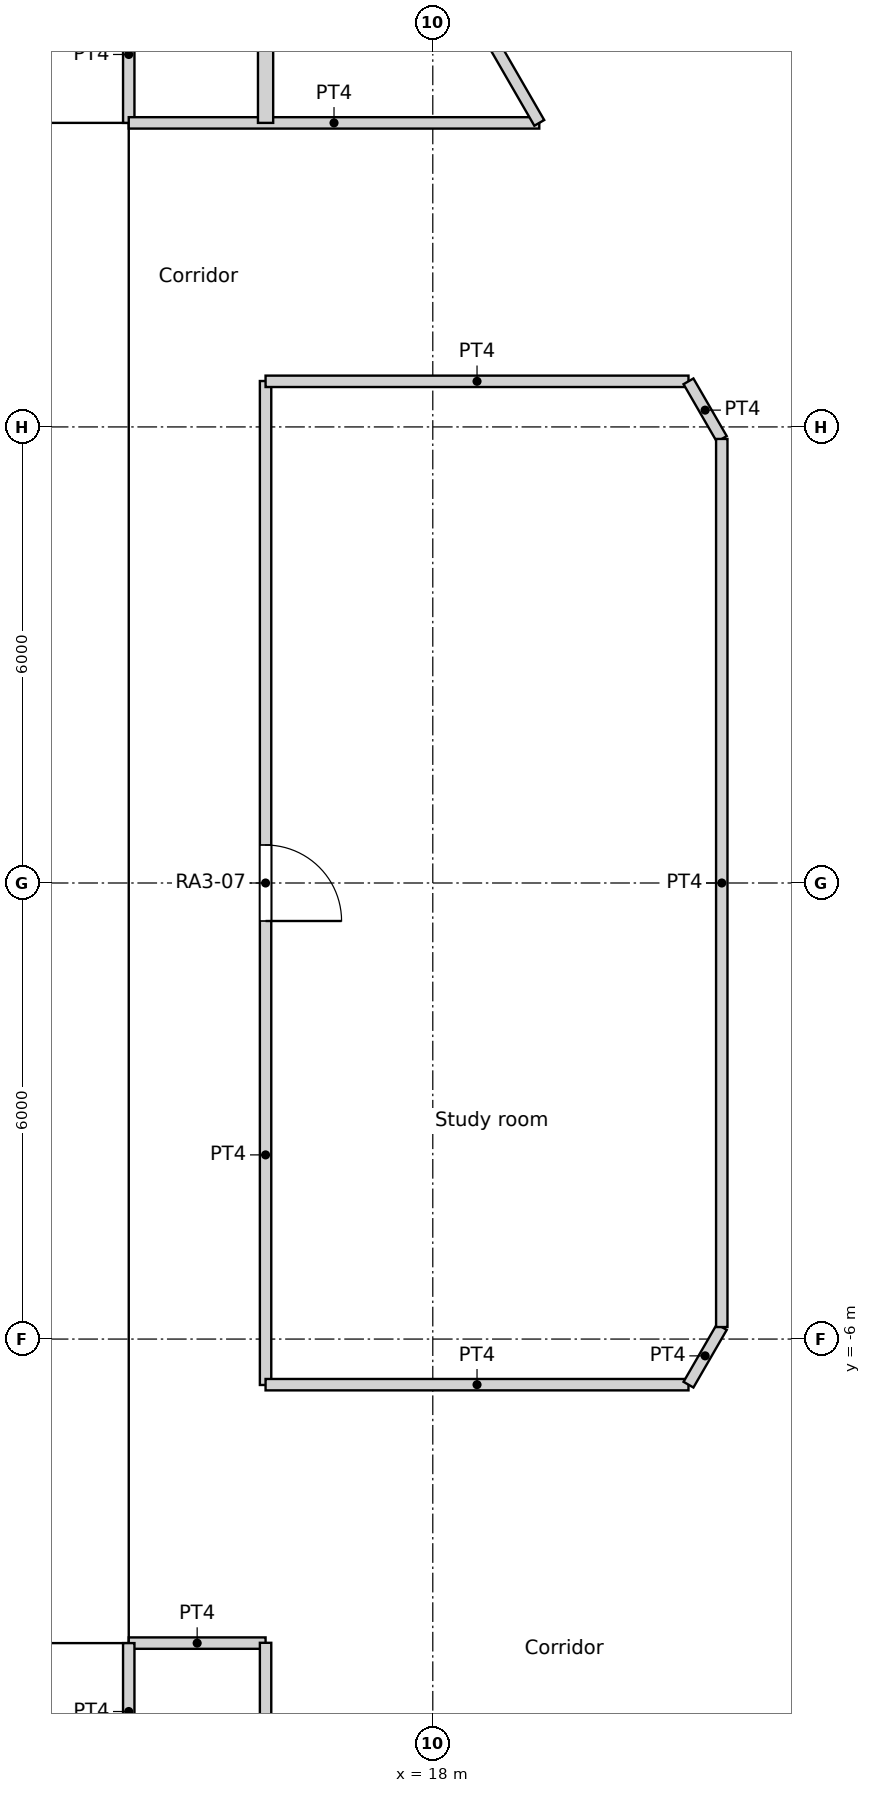
"""IFC4 building model, lengths in metres.
Left out: names, types, materials, properties, quantities, classifications, styles, units other than length and angle.
Written with IfcOpenShell. Run it as: python <this file> out.ifc"""

import sys

from ifc_helpers import new_model, si_unit, direction, frame, frame_2d, origin, origin_2d, place, context, subcontext, project, spatial, rectangle, circle, extrude, element, fill, save


model = new_model("IFC4")
c1 = context("Model", 3, precision=1e-05, world=origin(), true_north=direction((0.0, 1.0)))
c2 = subcontext(c1, "Body", "Model", "MODEL_VIEW")
j1 = project(units=[si_unit("LENGTHUNIT", "METRE"), si_unit("PLANEANGLEUNIT", "RADIAN")], contexts=[c1])
p1 = place(None, origin())
s1 = spatial("IfcSite", under=j1, at=p1, CompositionType="ELEMENT")
p2 = place(p1, origin())
s2 = spatial("IfcBuilding", under=s1, at=p2, CompositionType="ELEMENT")
p3 = place(p2, frame((0.0, 0.0, 49.8)))
s3 = spatial("IfcBuildingStorey", under=s2, at=p3, CompositionType="ELEMENT", Elevation=49.8)
for number, where, z_axis, x_axis in (
    (1, (21.937, 11.017, 0.0), (0.0, 0.0, 1.0), (1.0, 0.0, 0.0)),
    (2, (21.937, -11.017, 0.0), (0.0, 0.0, 1.0), (1.0, 0.0, 0.0)),
):
    element("IfcColumn", number, at=place(p3, frame(where, z_axis=z_axis, x_axis=x_axis)), inside=s3, PredefinedType="COLUMN", context=c2, shape_type="SweptSolid", body=[
        extrude(circle(Radius=0.75, at=origin_2d()), origin(), (0.0, 0.0, 1.0), 3.6),
    ])
for number, where, z_axis, x_axis in (
    (3, (18.822, 0.0, 0.0), (0.0, 0.0, 1.0), (1.0, 0.0, 0.0)),
    (4, (17.986, 5.548, 0.0), (0.0, 0.0, 1.0), (1.0, 0.0, 0.0)),
    (5, (15.552, 10.603, 0.0), (0.0, 0.0, 1.0), (1.0, 0.0, 0.0)),
    (6, (15.552, -10.603, 0.0), (0.0, 0.0, 1.0), (1.0, 0.0, 0.0)),
    (7, (17.986, -5.548, 0.0), (0.0, 0.0, 1.0), (1.0, 0.0, 0.0)),
):
    element("IfcColumn", number, at=place(p3, frame(where, z_axis=z_axis, x_axis=x_axis)), inside=s3, PredefinedType="COLUMN", context=c2, shape_type="SweptSolid", body=[
        extrude(circle(Radius=0.8, at=origin_2d()), origin(), (0.0, 0.0, 1.0), 3.6),
    ])
p4 = place(p3, frame((-14.0, -9.4, 0.0), z_axis=(0.0, 0.0, 1.0), x_axis=(1.0, 0.0, 0.0)))
e8 = element("IfcWall", 8, at=p4, inside=s3, PredefinedType="SOLIDWALL", context=c2, shape_type="SweptSolid", body=[
    extrude(rectangle(XDim=28.0, YDim=1.2, at=frame_2d((14.0, 0.0))), origin(), (0.0, 0.0, 1.0), 3.6),
])
p5 = place(p4, frame((14.9, 0.0, 0.0)))
e9 = element("IfcOpeningElement", 9, at=p5, cuts=e8, PredefinedType="OPENING", context=c2, shape_type="SweptSolid", body=[
    extrude(rectangle(XDim=1.0, YDim=2.1, at=frame_2d((0.5, 1.05))), frame((0.0, 0.6, 0.0), z_axis=(0.0, -1.0, 0.0), x_axis=(1.0, 0.0, 0.0)), (0.0, 0.0, 1.0), 1.2),
])
p6 = place(p4, frame((9.8, 0.0, 0.0)))
e10 = element("IfcOpeningElement", 10, at=p6, cuts=e8, PredefinedType="OPENING", context=c2, shape_type="SweptSolid", body=[
    extrude(rectangle(XDim=1.8, YDim=2.1, at=frame_2d((0.9, 1.05))), frame((0.0, 0.6, 0.0), z_axis=(0.0, -1.0, 0.0), x_axis=(1.0, 0.0, 0.0)), (0.0, 0.0, 1.0), 1.2),
])
p7 = place(p4, frame((16.4, 0.0, 0.0)))
e11 = element("IfcOpeningElement", 11, at=p7, cuts=e8, PredefinedType="OPENING", context=c2, shape_type="SweptSolid", body=[
    extrude(rectangle(XDim=1.8, YDim=2.1, at=frame_2d((0.9, 1.05))), frame((0.0, 0.6, 0.0), z_axis=(0.0, -1.0, 0.0), x_axis=(1.0, 0.0, 0.0)), (0.0, 0.0, 1.0), 1.2),
])
p8 = place(p3, frame((-14.0, 9.4, 0.0), z_axis=(0.0, 0.0, 1.0), x_axis=(1.0, 0.0, 0.0)))
e12 = element("IfcWall", 12, at=p8, inside=s3, PredefinedType="SOLIDWALL", context=c2, shape_type="SweptSolid", body=[
    extrude(rectangle(XDim=28.0, YDim=1.2, at=frame_2d((14.0, 0.0))), origin(), (0.0, 0.0, 1.0), 3.6),
])
p9 = place(p8, frame((9.8, 0.0, 0.0)))
e13 = element("IfcOpeningElement", 13, at=p9, cuts=e12, PredefinedType="OPENING", context=c2, shape_type="SweptSolid", body=[
    extrude(rectangle(XDim=1.8, YDim=2.1, at=frame_2d((0.9, 1.05))), frame((0.0, 0.6, 0.0), z_axis=(0.0, -1.0, 0.0), x_axis=(1.0, 0.0, 0.0)), (0.0, 0.0, 1.0), 1.2),
])
p10 = place(p3, frame((13.4, -8.8, 0.0), z_axis=(0.0, 0.0, 1.0), x_axis=(0.0, 1.0, 0.0)))
e14 = element("IfcWall", 14, at=p10, inside=s3, PredefinedType="SOLIDWALL", context=c2, shape_type="SweptSolid", body=[
    extrude(rectangle(XDim=17.6, YDim=1.2, at=frame_2d((8.8, 0.0))), origin(), (0.0, 0.0, 1.0), 3.6),
])
p11 = place(p10, frame((6.3, 0.0, 0.0)))
e15 = element("IfcOpeningElement", 15, at=p11, cuts=e14, PredefinedType="OPENING", context=c2, shape_type="SweptSolid", body=[
    extrude(rectangle(XDim=1.0, YDim=2.1, at=frame_2d((0.5, 1.05))), frame((0.0, 0.6, 0.0), z_axis=(0.0, -1.0, 0.0), x_axis=(1.0, 0.0, 0.0)), (0.0, 0.0, 1.0), 1.2),
])
for number, where, z_axis, x_axis in (
    (16, (14.0, 10.0, 0.0), (0.0, 0.0, 1.0), (0.0, 1.0, 0.0)),
    (17, (14.0, -11.8, 0.0), (0.0, 0.0, 1.0), (0.0, 1.0, 0.0)),
):
    element("IfcWall", number, at=place(p3, frame(where, z_axis=z_axis, x_axis=x_axis)), inside=s3, PredefinedType="PARTITIONING", context=c2, shape_type="SweptSolid", body=[
        extrude(rectangle(XDim=1.8, YDim=0.15, at=frame_2d((0.9, 0.0))), origin(), (0.0, 0.0, 1.0), 3.15),
    ])
p12 = place(p3, frame((14.0, 10.0, 0.0), z_axis=(0.0, 0.0, 1.0), x_axis=(1.0, 0.0, 0.0)))
e18 = element("IfcWall", 18, at=p12, inside=s3, PredefinedType="PARTITIONING", context=c2, shape_type="SweptSolid", body=[
    extrude(rectangle(XDim=5.401, YDim=0.15, at=frame_2d((2.7, 0.0))), origin(), (0.0, 0.0, 1.0), 3.15),
])
p13 = place(p3, frame((14.0, -10.0, 0.0), z_axis=(0.0, 0.0, 1.0), x_axis=(1.0, 0.0, 0.0)))
e19 = element("IfcWall", 19, at=p13, inside=s3, PredefinedType="PARTITIONING", context=c2, shape_type="SweptSolid", body=[
    extrude(rectangle(XDim=1.8, YDim=0.15, at=frame_2d((0.9, 0.0))), origin(), (0.0, 0.0, 1.0), 3.15),
])
p14 = place(p3, frame((15.8, -6.604, 0.0), z_axis=(0.0, 0.0, 1.0), x_axis=(0.0, 1.0, 0.0)))
e20 = element("IfcWall", 20, at=p14, inside=s3, PredefinedType="PARTITIONING", context=c2, shape_type="SweptSolid", body=[
    extrude(rectangle(XDim=13.208, YDim=0.15, at=frame_2d((6.604, 0.0))), origin(), (0.0, 0.0, 1.0), 3.15),
])
p15 = place(p14, frame((6.104, 0.0, 0.0)))
e21 = element("IfcOpeningElement", 21, at=p15, cuts=e20, PredefinedType="OPENING", context=c2, shape_type="SweptSolid", body=[
    extrude(rectangle(XDim=1.0, YDim=2.04, at=frame_2d((0.5, 1.02))), frame((0.0, 0.075, 0.0), z_axis=(0.0, -1.0, 0.0), x_axis=(1.0, 0.0, 0.0)), (0.0, 0.0, 1.0), 0.15),
])
p16 = place(p3, frame((15.8, -16.053, 0.0), z_axis=(0.0, 0.0, 1.0), x_axis=(0.0, 1.0, 0.0)))
e22 = element("IfcWall", 22, at=p16, inside=s3, PredefinedType="PARTITIONING", context=c2, shape_type="SweptSolid", body=[
    extrude(rectangle(XDim=6.057, YDim=0.15, at=frame_2d((3.028, 0.0))), origin(), (0.0, 0.0, 1.0), 3.15),
])
p17 = place(p3, frame((15.8, -6.6, 0.0), z_axis=(0.0, 0.0, 1.0), x_axis=(1.0, 0.0, 0.0)))
e23 = element("IfcWall", 23, at=p17, inside=s3, PredefinedType="PARTITIONING", context=c2, shape_type="SweptSolid", body=[
    extrude(rectangle(XDim=5.564, YDim=0.15, at=frame_2d((2.782, 0.0))), origin(), (0.0, 0.0, 1.0), 3.15),
])
p18 = place(p3, frame((21.364, -6.6, 0.0), z_axis=(0.0, 0.0, 1.0), x_axis=(0.500277597875, 0.865865073245, 0.0)))
e24 = element("IfcWall", 24, at=p18, inside=s3, PredefinedType="PARTITIONING", context=c2, shape_type="SweptSolid", body=[
    extrude(rectangle(XDim=0.875, YDim=0.15, at=frame_2d((0.438, 0.0))), origin(), (0.0, 0.0, 1.0), 3.15),
])
p19 = place(p3, frame((21.802, -5.842, 0.0), z_axis=(0.0, 0.0, 1.0), x_axis=(0.0, 1.0, 0.0)))
e25 = element("IfcWall", 25, at=p19, inside=s3, PredefinedType="PARTITIONING", context=c2, shape_type="SweptSolid", body=[
    extrude(rectangle(XDim=11.684, YDim=0.15, at=frame_2d((5.842, 0.0))), origin(), (0.0, 0.0, 1.0), 3.15),
])
p20 = place(p3, frame((21.364, 6.6, 0.0), z_axis=(0.0, 0.0, 1.0), x_axis=(0.500277597875, -0.865865073245, 0.0)))
e26 = element("IfcWall", 26, at=p20, inside=s3, PredefinedType="PARTITIONING", context=c2, shape_type="SweptSolid", body=[
    extrude(rectangle(XDim=0.875, YDim=0.15, at=frame_2d((0.438, 0.0))), origin(), (0.0, 0.0, 1.0), 3.15),
])
p21 = place(p3, frame((15.8, 6.6, 0.0), z_axis=(0.0, 0.0, 1.0), x_axis=(1.0, 0.0, 0.0)))
e27 = element("IfcWall", 27, at=p21, inside=s3, PredefinedType="PARTITIONING", context=c2, shape_type="SweptSolid", body=[
    extrude(rectangle(XDim=5.564, YDim=0.15, at=frame_2d((2.782, 0.0))), origin(), (0.0, 0.0, 1.0), 3.15),
])
p22 = place(p3, frame((15.96, 15.96, 0.0), z_axis=(0.0, 0.0, 1.0), x_axis=(0.499992689227, -0.86602962462, 0.0)))
e28 = element("IfcWall", 28, at=p22, inside=s3, PredefinedType="PARTITIONING", context=c2, shape_type="SweptSolid", body=[
    extrude(rectangle(XDim=6.882, YDim=0.15, at=frame_2d((3.441, 0.0))), origin(), (0.0, 0.0, 1.0), 3.15),
])
p23 = place(p22, frame((2.941, 0.0, 0.0)))
e29 = element("IfcOpeningElement", 29, at=p23, cuts=e28, PredefinedType="OPENING", context=c2, shape_type="SweptSolid", body=[
    extrude(rectangle(XDim=1.0, YDim=2.04, at=frame_2d((0.5, 1.02))), frame((0.0, 0.075, 0.0), z_axis=(0.0, -1.0, 0.0), x_axis=(1.0, 0.0, 0.0)), (0.0, 0.0, 1.0), 0.15),
])
p24 = place(p3, frame((22.141, 14.229, 0.0), z_axis=(0.0, 0.0, 1.0), x_axis=(0.281730446162, -0.959493593363, 0.0)))
e30 = element("IfcWall", 30, at=p24, inside=s3, PredefinedType="PARTITIONING", context=c2, shape_type="SweptSolid", body=[
    extrude(rectangle(XDim=14.83, YDim=0.15, at=frame_2d((7.415, 0.0))), origin(), (0.0, 0.0, 1.0), 3.15),
])
p25 = place(p24, frame((5.715, 0.0, 0.0)))
e31 = element("IfcOpeningElement", 31, at=p25, cuts=e30, PredefinedType="OPENING", context=c2, shape_type="SweptSolid", body=[
    extrude(rectangle(XDim=1.8, YDim=2.1, at=frame_2d((0.9, 1.05))), frame((0.0, 0.075, 0.0), z_axis=(0.0, -1.0, 0.0), x_axis=(1.0, 0.0, 0.0)), (0.0, 0.0, 1.0), 0.15),
])
p26 = place(p3, frame((22.141, -14.229, 0.0), z_axis=(0.0, 0.0, 1.0), x_axis=(0.281730446162, 0.959493593363, 0.0)))
e32 = element("IfcWall", 32, at=p26, inside=s3, PredefinedType="PARTITIONING", context=c2, shape_type="SweptSolid", body=[
    extrude(rectangle(XDim=14.83, YDim=0.15, at=frame_2d((7.415, 0.0))), origin(), (0.0, 0.0, 1.0), 3.15),
])
p27 = place(p26, frame((6.515, 0.0, 0.0)))
e33 = element("IfcOpeningElement", 33, at=p27, cuts=e32, PredefinedType="OPENING", context=c2, shape_type="SweptSolid", body=[
    extrude(rectangle(XDim=1.0, YDim=2.04, at=frame_2d((0.5, 1.02))), frame((0.0, 0.075, 0.0), z_axis=(0.0, -1.0, 0.0), x_axis=(1.0, 0.0, 0.0)), (0.0, 0.0, 1.0), 0.15),
])
p28 = place(p3, frame((15.8, 10.0, 0.0), z_axis=(0.0, 0.0, 1.0), x_axis=(0.0, 1.0, 0.0)))
e34 = element("IfcWall", 34, at=p28, inside=s3, PredefinedType="PARTITIONING", context=c2, shape_type="SweptSolid", body=[
    extrude(rectangle(XDim=6.053, YDim=0.2, at=frame_2d((3.026, 0.0))), origin(), (0.0, 0.0, 1.0), 3.15),
])
p29 = place(p11, origin())
e35 = element("IfcDoor", 35, at=p29, inside=s3, OperationType="DOUBLE_DOOR_SINGLE_SWING", PredefinedType="DOOR", context=c2, shape_type="SweptSolid", body=[
    extrude(rectangle(XDim=1.0, YDim=2.1, at=frame_2d((0.5, 1.05))), frame((0.0, 0.025, 0.0), z_axis=(0.0, -1.0, 0.0), x_axis=(1.0, 0.0, 0.0)), (0.0, 0.0, 1.0), 0.05),
])
fill(e15, e35)
p30 = place(p15, origin())
e36 = element("IfcDoor", 36, at=p30, inside=s3, OperationType="SINGLE_SWING_RIGHT", PredefinedType="DOOR", context=c2, shape_type="SweptSolid", body=[
    extrude(rectangle(XDim=1.0, YDim=2.04, at=frame_2d((0.5, 1.02))), frame((0.0, 0.025, 0.0), z_axis=(0.0, -1.0, 0.0), x_axis=(1.0, 0.0, 0.0)), (0.0, 0.0, 1.0), 0.05),
])
fill(e21, e36)
save(model, sys.argv[1])
